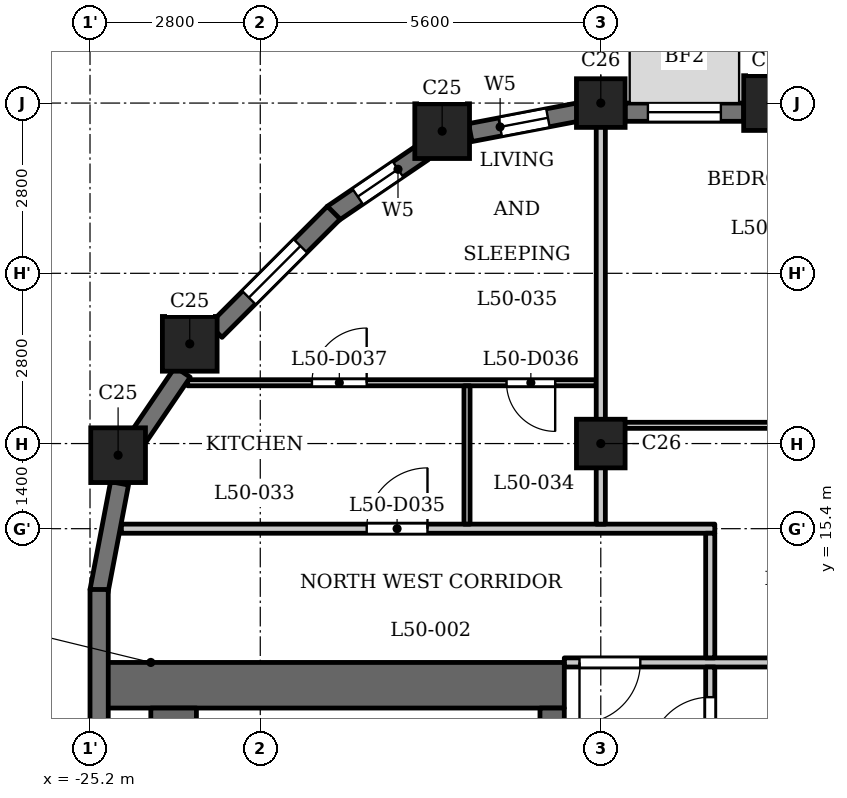
"""IFC4 building model, lengths in metres.
Left out: names, types, materials, properties, quantities, classifications, styles, units other than length and angle.
Written with IfcOpenShell. Run it as: python <this file> out.ifc"""

import sys

from ifc_helpers import new_model, si_unit, direction, frame, frame_2d, origin, origin_2d, place, context, subcontext, project, spatial, rectangle, extrude, element, fill, save


model = new_model("IFC4")
c1 = context("Model", 3, precision=1e-05, world=origin(), true_north=direction((0.0, 1.0)))
c2 = subcontext(c1, "Body", "Model", "MODEL_VIEW")
j1 = project(units=[si_unit("LENGTHUNIT", "METRE"), si_unit("PLANEANGLEUNIT", "RADIAN")], contexts=[c1])
p1 = place(None, origin())
s1 = spatial("IfcSite", under=j1, at=p1, CompositionType="ELEMENT")
p2 = place(p1, origin())
s2 = spatial("IfcBuilding", under=s1, at=p2, CompositionType="ELEMENT")
p3 = place(p2, frame((0.0, 0.0, 195.9)))
s3 = spatial("IfcBuildingStorey", under=s2, at=p3, CompositionType="ELEMENT", Elevation=195.9)
for number, where, z_axis, x_axis in (
    (1, (-14.0, 22.4, 0.0), (0.0, 0.0, 1.0), (1.0, 0.0, 0.0)),
    (2, (-19.409, 21.938, 0.0), (0.0, 0.0, 1.0), (1.0, 0.0, 0.0)),
    (3, (-23.56, 18.44, 0.0), (0.0, 0.0, 1.0), (1.0, 0.0, 0.0)),
    (4, (-24.738, 16.609, 0.0), (0.0, 0.0, 1.0), (1.0, 0.0, 0.0)),
):
    element("IfcColumn", number, at=place(p3, frame(where, z_axis=z_axis, x_axis=x_axis)), inside=s3, PredefinedType="COLUMN", context=c2, shape_type="SweptSolid", body=[
        extrude(rectangle(XDim=0.9, YDim=0.9, at=origin_2d()), origin(), (0.0, 0.0, 1.0), 3.5),
    ])
for number, where, z_axis, x_axis in (
    (5, (-16.8, 16.8, 0.0), (0.0, 0.0, 1.0), (1.0, 0.0, 0.0)),
    (6, (-16.8, 22.4, 0.0), (0.0, 0.0, 1.0), (1.0, 0.0, 0.0)),
):
    element("IfcColumn", number, at=place(p3, frame(where, z_axis=z_axis, x_axis=x_axis)), inside=s3, PredefinedType="COLUMN", context=c2, shape_type="SweptSolid", body=[
        extrude(rectangle(XDim=0.8, YDim=0.8, at=origin_2d()), origin(), (0.0, 0.0, 1.0), 3.5),
    ])
p4 = place(p3, frame((-14.45, 22.25, 0.0), z_axis=(0.0, 0.0, 1.0), x_axis=(-1.0, 0.0, 0.0)))
e7 = element("IfcWall", 7, at=p4, inside=s3, PredefinedType="SOLIDWALL", context=c2, shape_type="SweptSolid", body=[
    extrude(rectangle(XDim=1.95, YDim=0.3, at=frame_2d((0.975, 0.0))), origin(), (0.0, 0.0, 1.0), 2.5),
])
p5 = place(p4, frame((0.375, 0.0, 0.6)))
e8 = element("IfcOpeningElement", 8, at=p5, cuts=e7, PredefinedType="OPENING", context=c2, shape_type="SweptSolid", body=[
    extrude(rectangle(XDim=1.2, YDim=1.55, at=frame_2d((0.6, 0.775))), frame((0.0, 0.16, 0.0), z_axis=(0.0, -1.0, 0.0), x_axis=(1.0, 0.0, 0.0)), (0.0, 0.0, 1.0), 0.32),
])
p6 = place(p3, frame((-17.179, 22.251, 0.0), z_axis=(0.0, 0.0, 1.0), x_axis=(-0.98230529033, -0.187286722942, 0.0)))
e9 = element("IfcWall", 9, at=p6, inside=s3, PredefinedType="SOLIDWALL", context=c2, shape_type="SweptSolid", body=[
    extrude(rectangle(XDim=1.799, YDim=0.3, at=frame_2d((0.899, 0.0))), origin(), (0.0, 0.0, 1.0), 2.5),
])
p7 = place(p6, frame((0.5, 0.0, 0.6)))
e10 = element("IfcOpeningElement", 10, at=p7, cuts=e9, PredefinedType="OPENING", context=c2, shape_type="SweptSolid", body=[
    extrude(rectangle(XDim=0.8, YDim=1.55, at=frame_2d((0.4, 0.775))), frame((0.0, 0.16, 0.0), z_axis=(0.0, -1.0, 0.0), x_axis=(1.0, 0.0, 0.0)), (0.0, 0.0, 1.0), 0.32),
])
p8 = place(p3, frame((-19.719, 21.594, 0.0), z_axis=(0.0, 0.0, 1.0), x_axis=(-0.827067282455, -0.562102935673, 0.0)))
e11 = element("IfcWall", 11, at=p8, inside=s3, PredefinedType="SOLIDWALL", context=c2, shape_type="SweptSolid", body=[
    extrude(rectangle(XDim=1.806, YDim=0.3, at=frame_2d((0.903, 0.0))), origin(), (0.0, 0.0, 1.0), 2.5),
])
p9 = place(p8, frame((0.503, 0.0, 0.6)))
e12 = element("IfcOpeningElement", 12, at=p9, cuts=e11, PredefinedType="OPENING", context=c2, shape_type="SweptSolid", body=[
    extrude(rectangle(XDim=0.8, YDim=1.55, at=frame_2d((0.4, 0.775))), frame((0.0, 0.16, 0.0), z_axis=(0.0, -1.0, 0.0), x_axis=(1.0, 0.0, 0.0)), (0.0, 0.0, 1.0), 0.32),
])
p10 = place(p3, frame((-21.191, 20.597, 0.0), z_axis=(0.0, 0.0, 1.0), x_axis=(-0.707106781187, -0.707106781187, 0.0)))
e13 = element("IfcWall", 13, at=p10, inside=s3, PredefinedType="SOLIDWALL", context=c2, shape_type="SweptSolid", body=[
    extrude(rectangle(XDim=2.75, YDim=0.3, at=frame_2d((1.375, 0.0))), origin(), (0.0, 0.0, 1.0), 2.5),
])
p11 = place(p10, frame((0.775, 0.0, 0.6)))
e14 = element("IfcOpeningElement", 14, at=p11, cuts=e13, PredefinedType="OPENING", context=c2, shape_type="SweptSolid", body=[
    extrude(rectangle(XDim=1.2, YDim=1.55, at=frame_2d((0.6, 0.775))), frame((0.0, 0.16, 0.0), z_axis=(0.0, -1.0, 0.0), x_axis=(1.0, 0.0, 0.0)), (0.0, 0.0, 1.0), 0.32),
])
p12 = place(p3, frame((-23.676, 17.975, 0.0), z_axis=(0.0, 0.0, 1.0), x_axis=(-0.56200149592, -0.827136215253, 0.0)))
e15 = element("IfcWall", 15, at=p12, inside=s3, PredefinedType="SOLIDWALL", context=c2, shape_type="SweptSolid", body=[
    extrude(rectangle(XDim=1.277, YDim=0.3, at=frame_2d((0.639, 0.0))), origin(), (0.0, 0.0, 1.0), 2.5),
])
p13 = place(p3, frame((-24.714, 16.146, 0.0), z_axis=(0.0, 0.0, 1.0), x_axis=(-0.187348135549, -0.982293579388, 0.0)))
e16 = element("IfcWall", 16, at=p13, inside=s3, PredefinedType="SOLIDWALL", context=c2, shape_type="SweptSolid", body=[
    extrude(rectangle(XDim=1.806, YDim=0.3, at=frame_2d((0.903, 0.0))), origin(), (0.0, 0.0, 1.0), 2.5),
])
p14 = place(p3, frame((-25.05, 14.4, 0.0), z_axis=(0.0, 0.0, 1.0), x_axis=(0.0, -1.0, 0.0)))
e17 = element("IfcWall", 17, at=p14, inside=s3, PredefinedType="SOLIDWALL", context=c2, shape_type="SweptSolid", body=[
    extrude(rectangle(XDim=2.75, YDim=0.3, at=frame_2d((1.375, 0.0))), origin(), (0.0, 0.0, 1.0), 2.5),
])
p15 = place(p3, frame((-17.4, 12.825, 0.0), z_axis=(0.0, 0.0, 1.0), x_axis=(-1.0, 0.0, 0.0)))
e18 = element("IfcWall", 18, at=p15, inside=s3, PredefinedType="SHEAR", context=c2, shape_type="SweptSolid", body=[
    extrude(rectangle(XDim=7.6, YDim=0.75, at=frame_2d((3.8, 0.0))), origin(), (0.0, 0.0, 1.0), 3.2),
])
p16 = place(p3, frame((-17.6, -12.45, 0.0), z_axis=(0.0, 0.0, 1.0), x_axis=(0.0, 1.0, 0.0)))
e19 = element("IfcWall", 19, at=p16, inside=s3, PredefinedType="SHEAR", context=c2, shape_type="SweptSolid", body=[
    extrude(rectangle(XDim=24.9, YDim=0.4, at=frame_2d((12.45, 0.0))), origin(), (0.0, 0.0, 1.0), 3.2),
])
p17 = place(p16, frame((6.325, 0.0, 0.0)))
e20 = element("IfcOpeningElement", 20, at=p17, cuts=e19, PredefinedType="OPENING", context=c2, shape_type="SweptSolid", body=[
    extrude(rectangle(XDim=0.9, YDim=2.1, at=frame_2d((0.45, 1.05))), frame((0.0, 0.21, 0.0), z_axis=(0.0, -1.0, 0.0), x_axis=(1.0, 0.0, 0.0)), (0.0, 0.0, 1.0), 0.42),
])
p18 = place(p16, frame((9.925, 0.0, 0.0)))
e21 = element("IfcOpeningElement", 21, at=p18, cuts=e19, PredefinedType="OPENING", context=c2, shape_type="SweptSolid", body=[
    extrude(rectangle(XDim=0.9, YDim=2.1, at=frame_2d((0.45, 1.05))), frame((0.0, 0.21, 0.0), z_axis=(0.0, -1.0, 0.0), x_axis=(1.0, 0.0, 0.0)), (0.0, 0.0, 1.0), 0.42),
])
p19 = place(p16, frame((15.6, 0.0, 0.0)))
e22 = element("IfcOpeningElement", 22, at=p19, cuts=e19, PredefinedType="OPENING", context=c2, shape_type="SweptSolid", body=[
    extrude(rectangle(XDim=1.1, YDim=2.1, at=frame_2d((0.55, 1.05))), frame((0.0, 0.21, 0.0), z_axis=(0.0, -1.0, 0.0), x_axis=(1.0, 0.0, 0.0)), (0.0, 0.0, 1.0), 0.42),
])
p20 = place(p16, frame((18.0, 0.0, 0.0)))
e23 = element("IfcOpeningElement", 23, at=p20, cuts=e19, PredefinedType="OPENING", context=c2, shape_type="SweptSolid", body=[
    extrude(rectangle(XDim=1.1, YDim=2.1, at=frame_2d((0.55, 1.05))), frame((0.0, 0.21, 0.0), z_axis=(0.0, -1.0, 0.0), x_axis=(1.0, 0.0, 0.0)), (0.0, 0.0, 1.0), 0.42),
])
p21 = place(p16, frame((23.025, 0.0, 0.0)))
e24 = element("IfcOpeningElement", 24, at=p21, cuts=e19, PredefinedType="OPENING", context=c2, shape_type="SweptSolid", body=[
    extrude(rectangle(XDim=1.1, YDim=2.1, at=frame_2d((0.55, 1.05))), frame((0.0, 0.21, 0.0), z_axis=(0.0, -1.0, 0.0), x_axis=(1.0, 0.0, 0.0)), (0.0, 0.0, 1.0), 0.42),
])
p22 = place(p16, frame((0.775, 0.0, 0.0)))
e25 = element("IfcOpeningElement", 25, at=p22, cuts=e19, PredefinedType="OPENING", context=c2, shape_type="SweptSolid", body=[
    extrude(rectangle(XDim=1.1, YDim=2.1, at=frame_2d((0.55, 1.05))), frame((0.0, 0.21, 0.0), z_axis=(0.0, -1.0, 0.0), x_axis=(1.0, 0.0, 0.0)), (0.0, 0.0, 1.0), 0.42),
])
p23 = place(p16, frame((12.925, 0.0, 0.0)))
e26 = element("IfcOpeningElement", 26, at=p23, cuts=e19, PredefinedType="OPENING", context=c2, shape_type="SweptSolid", body=[
    extrude(rectangle(XDim=1.8, YDim=2.1, at=frame_2d((0.9, 1.05))), frame((0.0, 0.21, 0.0), z_axis=(0.0, -1.0, 0.0), x_axis=(1.0, 0.0, 0.0)), (0.0, 0.0, 1.0), 0.42),
])
p24 = place(p3, frame((-23.825, -12.45, 0.0), z_axis=(0.0, 0.0, 1.0), x_axis=(0.0, 1.0, 0.0)))
e27 = element("IfcWall", 27, at=p24, inside=s3, PredefinedType="SHEAR", context=c2, shape_type="SweptSolid", body=[
    extrude(rectangle(XDim=24.9, YDim=0.75, at=frame_2d((12.45, 0.0))), origin(), (0.0, 0.0, 1.0), 3.2),
])
p25 = place(p3, frame((-17.4, 13.2, 0.0), z_axis=(0.0, 0.0, 1.0), x_axis=(1.0, 0.0, 0.0)))
e28 = element("IfcWall", 28, at=p25, inside=s3, PredefinedType="PARTITIONING", context=c2, shape_type="SweptSolid", body=[
    extrude(rectangle(XDim=34.8, YDim=0.15, at=frame_2d((17.4, 0.0))), origin(), (0.0, 0.0, 1.0), 3.2),
])
p26 = place(p25, frame((0.25, 0.0, 0.0)))
e29 = element("IfcOpeningElement", 29, at=p26, cuts=e28, PredefinedType="OPENING", context=c2, shape_type="SweptSolid", body=[
    extrude(rectangle(XDim=1.0, YDim=2.1, at=frame_2d((0.5, 1.05))), frame((0.0, 0.085, 0.0), z_axis=(0.0, -1.0, 0.0), x_axis=(1.0, 0.0, 0.0)), (0.0, 0.0, 1.0), 0.17),
])
p27 = place(p25, frame((33.65, 0.0, 0.0)))
e30 = element("IfcOpeningElement", 30, at=p27, cuts=e28, PredefinedType="OPENING", context=c2, shape_type="SweptSolid", body=[
    extrude(rectangle(XDim=1.0, YDim=2.1, at=frame_2d((0.5, 1.05))), frame((0.0, 0.085, 0.0), z_axis=(0.0, -1.0, 0.0), x_axis=(1.0, 0.0, 0.0)), (0.0, 0.0, 1.0), 0.17),
])
p28 = place(p25, frame((10.15, 0.0, 0.0)))
e31 = element("IfcOpeningElement", 31, at=p28, cuts=e28, PredefinedType="OPENING", context=c2, shape_type="SweptSolid", body=[
    extrude(rectangle(XDim=1.0, YDim=2.1, at=frame_2d((0.5, 1.05))), frame((0.0, 0.085, 0.0), z_axis=(0.0, -1.0, 0.0), x_axis=(1.0, 0.0, 0.0)), (0.0, 0.0, 1.0), 0.17),
])
p29 = place(p25, frame((13.55, 0.0, 0.0)))
e32 = element("IfcOpeningElement", 32, at=p29, cuts=e28, PredefinedType="OPENING", context=c2, shape_type="SweptSolid", body=[
    extrude(rectangle(XDim=1.0, YDim=2.1, at=frame_2d((0.5, 1.05))), frame((0.0, 0.085, 0.0), z_axis=(0.0, -1.0, 0.0), x_axis=(1.0, 0.0, 0.0)), (0.0, 0.0, 1.0), 0.17),
])
p30 = place(p25, frame((20.85, 0.0, 0.0)))
e33 = element("IfcOpeningElement", 33, at=p30, cuts=e28, PredefinedType="OPENING", context=c2, shape_type="SweptSolid", body=[
    extrude(rectangle(XDim=1.0, YDim=2.1, at=frame_2d((0.5, 1.05))), frame((0.0, 0.085, 0.0), z_axis=(0.0, -1.0, 0.0), x_axis=(1.0, 0.0, 0.0)), (0.0, 0.0, 1.0), 0.17),
])
p31 = place(p25, frame((23.7, 0.0, 0.0)))
e34 = element("IfcOpeningElement", 34, at=p31, cuts=e28, PredefinedType="OPENING", context=c2, shape_type="SweptSolid", body=[
    extrude(rectangle(XDim=1.0, YDim=2.1, at=frame_2d((0.5, 1.05))), frame((0.0, 0.085, 0.0), z_axis=(0.0, -1.0, 0.0), x_axis=(1.0, 0.0, 0.0)), (0.0, 0.0, 1.0), 0.17),
])
p32 = place(p3, frame((-24.684, 15.4, 0.0), z_axis=(0.0, 0.0, 1.0), x_axis=(1.0, 0.0, 0.0)))
e35 = element("IfcWall", 35, at=p32, inside=s3, PredefinedType="PARTITIONING", context=c2, shape_type="SweptSolid", body=[
    extrude(rectangle(XDim=9.759, YDim=0.15, at=frame_2d((4.879, 0.0))), origin(), (0.0, 0.0, 1.0), 3.2),
])
p33 = place(p32, frame((4.034, 0.0, 0.0)))
e36 = element("IfcOpeningElement", 36, at=p33, cuts=e35, PredefinedType="OPENING", context=c2, shape_type="SweptSolid", body=[
    extrude(rectangle(XDim=1.0, YDim=2.1, at=frame_2d((0.5, 1.05))), frame((0.0, 0.085, 0.0), z_axis=(0.0, -1.0, 0.0), x_axis=(1.0, 0.0, 0.0)), (0.0, 0.0, 1.0), 0.17),
])
p34 = place(p3, frame((-16.725, 17.1, 0.0), z_axis=(0.0, 0.0, 1.0), x_axis=(1.0, 0.0, 0.0)))
e37 = element("IfcWall", 37, at=p34, inside=s3, PredefinedType="PARTITIONING", context=c2, shape_type="SweptSolid", body=[
    extrude(rectangle(XDim=33.45, YDim=0.1, at=frame_2d((16.725, 0.0))), origin(), (0.0, 0.0, 1.0), 3.2),
])
p35 = place(p34, frame((4.075, 0.0, 0.0)))
e38 = element("IfcOpeningElement", 38, at=p35, cuts=e37, PredefinedType="OPENING", context=c2, shape_type="SweptSolid", body=[
    extrude(rectangle(XDim=0.8, YDim=2.1, at=frame_2d((0.4, 1.05))), frame((0.0, 0.06, 0.0), z_axis=(0.0, -1.0, 0.0), x_axis=(1.0, 0.0, 0.0)), (0.0, 0.0, 1.0), 0.12),
])
p36 = place(p34, frame((9.575, 0.0, 0.0)))
e39 = element("IfcOpeningElement", 39, at=p36, cuts=e37, PredefinedType="OPENING", context=c2, shape_type="SweptSolid", body=[
    extrude(rectangle(XDim=0.9, YDim=2.1, at=frame_2d((0.45, 1.05))), frame((0.0, 0.06, 0.0), z_axis=(0.0, -1.0, 0.0), x_axis=(1.0, 0.0, 0.0)), (0.0, 0.0, 1.0), 0.12),
])
p37 = place(p34, frame((15.175, 0.0, 0.0)))
e40 = element("IfcOpeningElement", 40, at=p37, cuts=e37, PredefinedType="OPENING", context=c2, shape_type="SweptSolid", body=[
    extrude(rectangle(XDim=0.8, YDim=2.1, at=frame_2d((0.4, 1.05))), frame((0.0, 0.06, 0.0), z_axis=(0.0, -1.0, 0.0), x_axis=(1.0, 0.0, 0.0)), (0.0, 0.0, 1.0), 0.12),
])
p38 = place(p34, frame((12.975, 0.0, 0.0)))
e41 = element("IfcOpeningElement", 41, at=p38, cuts=e37, PredefinedType="OPENING", context=c2, shape_type="SweptSolid", body=[
    extrude(rectangle(XDim=0.9, YDim=2.1, at=frame_2d((0.45, 1.05))), frame((0.0, 0.06, 0.0), z_axis=(0.0, -1.0, 0.0), x_axis=(1.0, 0.0, 0.0)), (0.0, 0.0, 1.0), 0.12),
])
p39 = place(p34, frame((17.625, 0.0, 0.0)))
e42 = element("IfcOpeningElement", 42, at=p39, cuts=e37, PredefinedType="OPENING", context=c2, shape_type="SweptSolid", body=[
    extrude(rectangle(XDim=0.8, YDim=2.1, at=frame_2d((0.4, 1.05))), frame((0.0, 0.06, 0.0), z_axis=(0.0, -1.0, 0.0), x_axis=(1.0, 0.0, 0.0)), (0.0, 0.0, 1.0), 0.12),
])
p40 = place(p34, frame((20.025, 0.0, 0.0)))
e43 = element("IfcOpeningElement", 43, at=p40, cuts=e37, PredefinedType="OPENING", context=c2, shape_type="SweptSolid", body=[
    extrude(rectangle(XDim=0.9, YDim=2.1, at=frame_2d((0.45, 1.05))), frame((0.0, 0.06, 0.0), z_axis=(0.0, -1.0, 0.0), x_axis=(1.0, 0.0, 0.0)), (0.0, 0.0, 1.0), 0.12),
])
p41 = place(p34, frame((31.975, 0.0, 0.0)))
e44 = element("IfcOpeningElement", 44, at=p41, cuts=e37, PredefinedType="OPENING", context=c2, shape_type="SweptSolid", body=[
    extrude(rectangle(XDim=0.8, YDim=2.1, at=frame_2d((0.4, 1.05))), frame((0.0, 0.06, 0.0), z_axis=(0.0, -1.0, 0.0), x_axis=(1.0, 0.0, 0.0)), (0.0, 0.0, 1.0), 0.12),
])
p42 = place(p34, frame((29.775, 0.0, 0.0)))
e45 = element("IfcOpeningElement", 45, at=p42, cuts=e37, PredefinedType="OPENING", context=c2, shape_type="SweptSolid", body=[
    extrude(rectangle(XDim=0.9, YDim=2.1, at=frame_2d((0.45, 1.05))), frame((0.0, 0.06, 0.0), z_axis=(0.0, -1.0, 0.0), x_axis=(1.0, 0.0, 0.0)), (0.0, 0.0, 1.0), 0.12),
])
p43 = place(p34, frame((23.025, 0.0, 0.0)))
e46 = element("IfcOpeningElement", 46, at=p43, cuts=e37, PredefinedType="OPENING", context=c2, shape_type="SweptSolid", body=[
    extrude(rectangle(XDim=0.9, YDim=2.1, at=frame_2d((0.45, 1.05))), frame((0.0, 0.06, 0.0), z_axis=(0.0, -1.0, 0.0), x_axis=(1.0, 0.0, 0.0)), (0.0, 0.0, 1.0), 0.12),
])
p44 = place(p34, frame((26.125, 0.0, 0.0)))
e47 = element("IfcOpeningElement", 47, at=p44, cuts=e37, PredefinedType="OPENING", context=c2, shape_type="SweptSolid", body=[
    extrude(rectangle(XDim=0.9, YDim=2.1, at=frame_2d((0.45, 1.05))), frame((0.0, 0.06, 0.0), z_axis=(0.0, -1.0, 0.0), x_axis=(1.0, 0.0, 0.0)), (0.0, 0.0, 1.0), 0.12),
])
p45 = place(p3, frame((-23.594, 17.8, 0.0), z_axis=(0.0, 0.0, 1.0), x_axis=(1.0, 0.0, 0.0)))
e48 = element("IfcWall", 48, at=p45, inside=s3, PredefinedType="PARTITIONING", context=c2, shape_type="SweptSolid", body=[
    extrude(rectangle(XDim=6.719, YDim=0.1, at=frame_2d((3.359, 0.0))), origin(), (0.0, 0.0, 1.0), 3.2),
])
p46 = place(p45, frame((5.244, 0.0, 0.0)))
e49 = element("IfcOpeningElement", 49, at=p46, cuts=e48, PredefinedType="OPENING", context=c2, shape_type="SweptSolid", body=[
    extrude(rectangle(XDim=0.8, YDim=2.1, at=frame_2d((0.4, 1.05))), frame((0.0, 0.06, 0.0), z_axis=(0.0, -1.0, 0.0), x_axis=(1.0, 0.0, 0.0)), (0.0, 0.0, 1.0), 0.12),
])
p47 = place(p45, frame((2.044, 0.0, 0.0)))
e50 = element("IfcOpeningElement", 50, at=p47, cuts=e48, PredefinedType="OPENING", context=c2, shape_type="SweptSolid", body=[
    extrude(rectangle(XDim=0.9, YDim=2.1, at=frame_2d((0.45, 1.05))), frame((0.0, 0.06, 0.0), z_axis=(0.0, -1.0, 0.0), x_axis=(1.0, 0.0, 0.0)), (0.0, 0.0, 1.0), 0.12),
])
p48 = place(p3, frame((-19.0, 15.475, 0.0), z_axis=(0.0, 0.0, 1.0), x_axis=(0.0, 1.0, 0.0)))
e51 = element("IfcWall", 51, at=p48, inside=s3, PredefinedType="PARTITIONING", context=c2, shape_type="SweptSolid", body=[
    extrude(rectangle(XDim=2.275, YDim=0.1, at=frame_2d((1.137, 0.0))), origin(), (0.0, 0.0, 1.0), 3.2),
])
p49 = place(p3, frame((-16.8, 15.475, 0.0), z_axis=(0.0, 0.0, 1.0), x_axis=(0.0, 1.0, 0.0)))
e52 = element("IfcWall", 52, at=p49, inside=s3, PredefinedType="PARTITIONING", context=c2, shape_type="SweptSolid", body=[
    extrude(rectangle(XDim=6.835, YDim=0.15, at=frame_2d((3.417, 0.0))), origin(), (0.0, 0.0, 1.0), 2.55),
])
p50 = place(p3, frame((-15.0, 6.769, 0.0), z_axis=(0.0, 0.0, 1.0), x_axis=(0.0, 1.0, 0.0)))
e53 = element("IfcWall", 53, at=p50, inside=s3, PredefinedType="PARTITIONING", context=c2, shape_type="SweptSolid", body=[
    extrude(rectangle(XDim=6.356, YDim=0.15, at=frame_2d((3.178, 0.0))), origin(), (0.0, 0.0, 1.0), 3.2),
])
p51 = place(p50, frame((4.86, 0.0, 0.0)))
e54 = element("IfcOpeningElement", 54, at=p51, cuts=e53, PredefinedType="OPENING", context=c2, shape_type="SweptSolid", body=[
    extrude(rectangle(XDim=1.0, YDim=2.1, at=frame_2d((0.5, 1.05))), frame((0.0, 0.085, 0.0), z_axis=(0.0, -1.0, 0.0), x_axis=(1.0, 0.0, 0.0)), (0.0, 0.0, 1.0), 0.17),
])
p52 = place(p3, frame((-15.0, 13.275, 0.0), z_axis=(0.0, 0.0, 1.0), x_axis=(0.0, 1.0, 0.0)))
e55 = element("IfcWall", 55, at=p52, inside=s3, PredefinedType="PARTITIONING", context=c2, shape_type="SweptSolid", body=[
    extrude(rectangle(XDim=2.05, YDim=0.15, at=frame_2d((1.025, 0.0))), origin(), (0.0, 0.0, 1.0), 3.2),
])
p53 = place(p51, origin())
e56 = element("IfcDoor", 56, at=p53, inside=s3, OperationType="SINGLE_SWING_RIGHT", PredefinedType="DOOR", context=c2, shape_type="SweptSolid", body=[
    extrude(rectangle(XDim=1.0, YDim=2.1, at=frame_2d((0.5, 1.05))), frame((0.0, 0.025, 0.0), z_axis=(0.0, -1.0, 0.0), x_axis=(1.0, 0.0, 0.0)), (0.0, 0.0, 1.0), 0.05),
])
fill(e54, e56)
p54 = place(p26, origin())
e57 = element("IfcDoor", 57, at=p54, inside=s3, OperationType="SINGLE_SWING_LEFT", PredefinedType="DOOR", context=c2, shape_type="SweptSolid", body=[
    extrude(rectangle(XDim=1.0, YDim=2.1, at=frame_2d((0.5, 1.05))), frame((0.0, 0.025, 0.0), z_axis=(0.0, -1.0, 0.0), x_axis=(1.0, 0.0, 0.0)), (0.0, 0.0, 1.0), 0.05),
])
fill(e29, e57)
p55 = place(p33, origin())
e58 = element("IfcDoor", 58, at=p55, inside=s3, OperationType="SINGLE_SWING_LEFT", PredefinedType="DOOR", context=c2, shape_type="SweptSolid", body=[
    extrude(rectangle(XDim=1.0, YDim=2.1, at=frame_2d((0.5, 1.05))), frame((0.0, 0.025, 0.0), z_axis=(0.0, -1.0, 0.0), x_axis=(1.0, 0.0, 0.0)), (0.0, 0.0, 1.0), 0.05),
])
fill(e36, e58)
p56 = place(p46, origin())
e59 = element("IfcDoor", 59, at=p56, inside=s3, OperationType="SINGLE_SWING_RIGHT", PredefinedType="DOOR", context=c2, shape_type="SweptSolid", body=[
    extrude(rectangle(XDim=0.8, YDim=2.1, at=frame_2d((0.4, 1.05))), frame((0.0, 0.025, 0.0), z_axis=(0.0, -1.0, 0.0), x_axis=(1.0, 0.0, 0.0)), (0.0, 0.0, 1.0), 0.05),
])
fill(e49, e59)
p57 = place(p47, origin())
e60 = element("IfcDoor", 60, at=p57, inside=s3, OperationType="SINGLE_SWING_LEFT", PredefinedType="DOOR", context=c2, shape_type="SweptSolid", body=[
    extrude(rectangle(XDim=0.9, YDim=2.1, at=frame_2d((0.45, 1.05))), frame((0.0, 0.025, 0.0), z_axis=(0.0, -1.0, 0.0), x_axis=(1.0, 0.0, 0.0)), (0.0, 0.0, 1.0), 0.05),
])
fill(e50, e60)
p58 = place(p5, origin())
e61 = element("IfcWindow", 61, at=p58, inside=s3, PartitioningType="SINGLE_PANEL", PredefinedType="WINDOW", context=c2, shape_type="SweptSolid", body=[
    extrude(rectangle(XDim=1.2, YDim=1.55, at=frame_2d((0.6, 0.775))), frame((0.0, 0.03, 0.0), z_axis=(0.0, -1.0, 0.0), x_axis=(1.0, 0.0, 0.0)), (0.0, 0.0, 1.0), 0.06),
])
fill(e8, e61)
p59 = place(p7, origin())
e62 = element("IfcWindow", 62, at=p59, inside=s3, PartitioningType="SINGLE_PANEL", PredefinedType="WINDOW", context=c2, shape_type="SweptSolid", body=[
    extrude(rectangle(XDim=0.8, YDim=1.55, at=frame_2d((0.4, 0.775))), frame((0.0, 0.03, 0.0), z_axis=(0.0, -1.0, 0.0), x_axis=(1.0, 0.0, 0.0)), (0.0, 0.0, 1.0), 0.06),
])
fill(e10, e62)
p60 = place(p9, origin())
e63 = element("IfcWindow", 63, at=p60, inside=s3, PartitioningType="SINGLE_PANEL", PredefinedType="WINDOW", context=c2, shape_type="SweptSolid", body=[
    extrude(rectangle(XDim=0.8, YDim=1.55, at=frame_2d((0.4, 0.775))), frame((0.0, 0.03, 0.0), z_axis=(0.0, -1.0, 0.0), x_axis=(1.0, 0.0, 0.0)), (0.0, 0.0, 1.0), 0.06),
])
fill(e12, e63)
p61 = place(p11, origin())
e64 = element("IfcWindow", 64, at=p61, inside=s3, PartitioningType="SINGLE_PANEL", PredefinedType="WINDOW", context=c2, shape_type="SweptSolid", body=[
    extrude(rectangle(XDim=1.2, YDim=1.55, at=frame_2d((0.6, 0.775))), frame((0.0, 0.03, 0.0), z_axis=(0.0, -1.0, 0.0), x_axis=(1.0, 0.0, 0.0)), (0.0, 0.0, 1.0), 0.06),
])
fill(e14, e64)
save(model, sys.argv[1])
